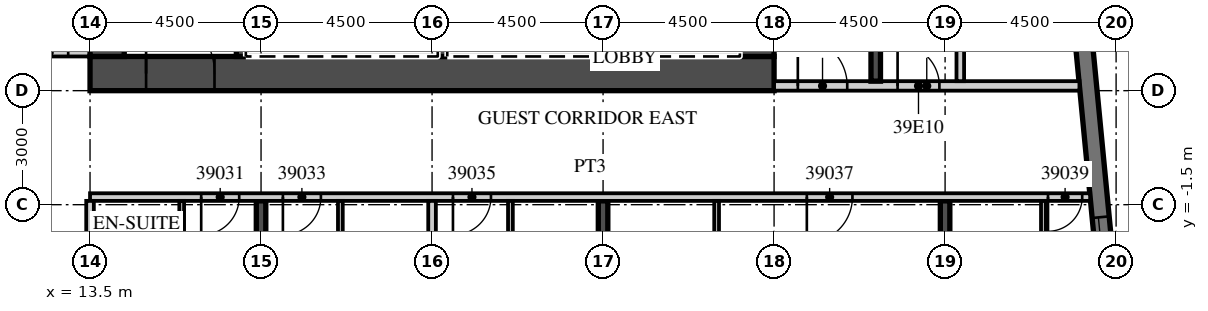
"""IFC4 building model, lengths in metres.
Left out: names, types, materials, properties, quantities, classifications, styles, units other than length and angle.
Written with IfcOpenShell. Run it as: python <this file> out.ifc"""

import sys

from ifc_helpers import new_model, si_unit, direction, frame, frame_2d, origin, place, context, subcontext, project, spatial, rectangle, extrude, element, fill, save


model = new_model("IFC4")
c1 = context("Model", 3, precision=1e-05, world=origin(), true_north=direction((0.0, 1.0)))
c2 = subcontext(c1, "Body", "Model", "MODEL_VIEW")
j1 = project(units=[si_unit("LENGTHUNIT", "METRE"), si_unit("PLANEANGLEUNIT", "RADIAN")], contexts=[c1])
p1 = place(None, origin())
s1 = spatial("IfcSite", under=j1, at=p1, CompositionType="ELEMENT")
p2 = place(p1, origin())
s2 = spatial("IfcBuilding", under=s1, at=p2, CompositionType="ELEMENT")
p3 = place(p2, frame((0.0, 0.0, 170.2)))
s3 = spatial("IfcBuildingStorey", under=s2, at=p3, CompositionType="ELEMENT", Elevation=170.2)
p4 = place(p3, frame((18.0, -19.245, 0.0), z_axis=(0.0, 0.0, 1.0), x_axis=(0.0, 1.0, 0.0)))
e1 = element("IfcWall", 1, at=p4, inside=s3, PredefinedType="SHEAR", context=c2, shape_type="SweptSolid", body=[
    extrude(rectangle(XDim=17.845, YDim=0.25, at=frame_2d((8.923, 0.0))), origin(), (0.0, 0.0, 1.0), 3.3),
])
p5 = place(p3, frame((27.0, -18.379, 0.0), z_axis=(0.0, 0.0, 1.0), x_axis=(0.0, 1.0, 0.0)))
e2 = element("IfcWall", 2, at=p5, inside=s3, PredefinedType="SHEAR", context=c2, shape_type="SweptSolid", body=[
    extrude(rectangle(XDim=16.979, YDim=0.25, at=frame_2d((8.489, 0.0))), origin(), (0.0, 0.0, 1.0), 3.3),
])
p6 = place(p3, frame((36.0, -17.512, 0.0), z_axis=(0.0, 0.0, 1.0), x_axis=(0.0, 1.0, 0.0)))
e3 = element("IfcWall", 3, at=p6, inside=s3, PredefinedType="SHEAR", context=c2, shape_type="SweptSolid", body=[
    extrude(rectangle(XDim=16.112, YDim=0.25, at=frame_2d((8.056, 0.0))), origin(), (0.0, 0.0, 1.0), 3.3),
])
p7 = place(p3, frame((41.214, -13.466, 0.0), z_axis=(0.0, 0.0, 1.0), x_axis=(-0.095847314626, 0.995396047952, 0.0)))
e4 = element("IfcWall", 4, at=p7, inside=s3, PredefinedType="SOLIDWALL", context=c2, shape_type="SweptSolid", body=[
    extrude(rectangle(XDim=34.0, YDim=0.45, at=frame_2d((17.0, 0.0))), origin(), (0.0, 0.0, 1.0), 3.02),
])
p8 = place(p7, frame((3.869, 0.0, 0.45)))
e5 = element("IfcOpeningElement", 5, at=p8, cuts=e4, PredefinedType="OPENING", context=c2, shape_type="SweptSolid", body=[
    extrude(rectangle(XDim=3.3, YDim=2.25, at=frame_2d((1.65, 1.125))), frame((0.0, 0.235, 0.0), z_axis=(0.0, -1.0, 0.0), x_axis=(1.0, 0.0, 0.0)), (0.0, 0.0, 1.0), 0.47),
])
p9 = place(p7, frame((8.39, 0.0, 0.45)))
e6 = element("IfcOpeningElement", 6, at=p9, cuts=e4, PredefinedType="OPENING", context=c2, shape_type="SweptSolid", body=[
    extrude(rectangle(XDim=3.3, YDim=2.25, at=frame_2d((1.65, 1.125))), frame((0.0, 0.235, 0.0), z_axis=(0.0, -1.0, 0.0), x_axis=(1.0, 0.0, 0.0)), (0.0, 0.0, 1.0), 0.47),
])
p10 = place(p3, frame((-13.5, 2.5, 0.0), z_axis=(0.0, 0.0, 1.0), x_axis=(1.0, 0.0, 0.0)))
e7 = element("IfcWall", 7, at=p10, inside=s3, PredefinedType="PARTITIONING", context=c2, shape_type="SweptSolid", body=[
    extrude(rectangle(XDim=27.0, YDim=0.2, at=frame_2d((13.5, 0.0))), origin(), (0.0, 0.0, 1.0), 3.02),
])
p11 = place(p10, frame((0.575, 0.0, 0.0)))
e8 = element("IfcOpeningElement", 8, at=p11, cuts=e7, PredefinedType="OPENING", context=c2, shape_type="SweptSolid", body=[
    extrude(rectangle(XDim=1.0, YDim=2.1, at=frame_2d((0.5, 1.05))), frame((0.0, 0.11, 0.0), z_axis=(0.0, -1.0, 0.0), x_axis=(1.0, 0.0, 0.0)), (0.0, 0.0, 1.0), 0.22),
])
p12 = place(p10, frame((7.45, 0.0, 0.0)))
e9 = element("IfcOpeningElement", 9, at=p12, cuts=e7, PredefinedType="OPENING", context=c2, shape_type="SweptSolid", body=[
    extrude(rectangle(XDim=1.0, YDim=2.1, at=frame_2d((0.5, 1.05))), frame((0.0, 0.11, 0.0), z_axis=(0.0, -1.0, 0.0), x_axis=(1.0, 0.0, 0.0)), (0.0, 0.0, 1.0), 0.22),
])
p13 = place(p10, frame((11.925, 0.0, 0.0)))
e10 = element("IfcOpeningElement", 10, at=p13, cuts=e7, PredefinedType="OPENING", context=c2, shape_type="SweptSolid", body=[
    extrude(rectangle(XDim=1.0, YDim=2.1, at=frame_2d((0.5, 1.05))), frame((0.0, 0.11, 0.0), z_axis=(0.0, -1.0, 0.0), x_axis=(1.0, 0.0, 0.0)), (0.0, 0.0, 1.0), 0.22),
])
p14 = place(p10, frame((15.938, 0.0, 0.0)))
e11 = element("IfcOpeningElement", 11, at=p14, cuts=e7, PredefinedType="OPENING", context=c2, shape_type="SweptSolid", body=[
    extrude(rectangle(XDim=1.2, YDim=2.1, at=frame_2d((0.6, 1.05))), frame((0.0, 0.11, 0.0), z_axis=(0.0, -1.0, 0.0), x_axis=(1.0, 0.0, 0.0)), (0.0, 0.0, 1.0), 0.22),
])
p15 = place(p10, frame((25.425, 0.0, 0.0)))
e12 = element("IfcOpeningElement", 12, at=p15, cuts=e7, PredefinedType="OPENING", context=c2, shape_type="SweptSolid", body=[
    extrude(rectangle(XDim=1.0, YDim=2.1, at=frame_2d((0.5, 1.05))), frame((0.0, 0.11, 0.0), z_axis=(0.0, -1.0, 0.0), x_axis=(1.0, 0.0, 0.0)), (0.0, 0.0, 1.0), 0.22),
])
p16 = place(p3, frame((13.5, -1.3, 0.0), z_axis=(0.0, 0.0, 1.0), x_axis=(1.0, 0.0, 0.0)))
e13 = element("IfcWall", 13, at=p16, inside=s3, PredefinedType="PARTITIONING", context=c2, shape_type="SweptSolid", body=[
    extrude(rectangle(XDim=26.317, YDim=0.2, at=frame_2d((13.158, 0.0))), origin(), (0.0, 0.0, 1.0), 3.02),
])
p17 = place(p16, frame((2.925, 0.0, 0.0)))
e14 = element("IfcOpeningElement", 14, at=p17, cuts=e13, PredefinedType="OPENING", context=c2, shape_type="SweptSolid", body=[
    extrude(rectangle(XDim=1.0, YDim=2.1, at=frame_2d((0.5, 1.05))), frame((0.0, 0.11, 0.0), z_axis=(0.0, -1.0, 0.0), x_axis=(1.0, 0.0, 0.0)), (0.0, 0.0, 1.0), 0.22),
])
p18 = place(p16, frame((5.075, 0.0, 0.0)))
e15 = element("IfcOpeningElement", 15, at=p18, cuts=e13, PredefinedType="OPENING", context=c2, shape_type="SweptSolid", body=[
    extrude(rectangle(XDim=1.0, YDim=2.1, at=frame_2d((0.5, 1.05))), frame((0.0, 0.11, 0.0), z_axis=(0.0, -1.0, 0.0), x_axis=(1.0, 0.0, 0.0)), (0.0, 0.0, 1.0), 0.22),
])
p19 = place(p16, frame((9.55, 0.0, 0.0)))
e16 = element("IfcOpeningElement", 16, at=p19, cuts=e13, PredefinedType="OPENING", context=c2, shape_type="SweptSolid", body=[
    extrude(rectangle(XDim=1.0, YDim=2.1, at=frame_2d((0.5, 1.05))), frame((0.0, 0.11, 0.0), z_axis=(0.0, -1.0, 0.0), x_axis=(1.0, 0.0, 0.0)), (0.0, 0.0, 1.0), 0.22),
])
p20 = place(p16, frame((18.862, 0.0, 0.0)))
e17 = element("IfcOpeningElement", 17, at=p20, cuts=e13, PredefinedType="OPENING", context=c2, shape_type="SweptSolid", body=[
    extrude(rectangle(XDim=1.2, YDim=2.1, at=frame_2d((0.6, 1.05))), frame((0.0, 0.11, 0.0), z_axis=(0.0, -1.0, 0.0), x_axis=(1.0, 0.0, 0.0)), (0.0, 0.0, 1.0), 0.22),
])
p21 = place(p16, frame((25.208, 0.0, 0.0)))
e18 = element("IfcOpeningElement", 18, at=p21, cuts=e13, PredefinedType="OPENING", context=c2, shape_type="SweptSolid", body=[
    extrude(rectangle(XDim=0.9, YDim=2.1, at=frame_2d((0.45, 1.05))), frame((0.0, 0.11, 0.0), z_axis=(0.0, -1.0, 0.0), x_axis=(1.0, 0.0, 0.0)), (0.0, 0.0, 1.0), 0.22),
])
p22 = place(p3, frame((13.5, -19.701, 0.0), z_axis=(0.0, 0.0, 1.0), x_axis=(0.0, 1.0, 0.0)))
e19 = element("IfcWall", 19, at=p22, inside=s3, PredefinedType="PARTITIONING", context=c2, shape_type="SweptSolid", body=[
    extrude(rectangle(XDim=18.301, YDim=0.2, at=frame_2d((9.15, 0.0))), origin(), (0.0, 0.0, 1.0), 3.02),
])
p23 = place(p3, frame((15.912, -7.125, 0.0), z_axis=(0.0, 0.0, 1.0), x_axis=(0.0, 1.0, 0.0)))
e20 = element("IfcWall", 20, at=p23, inside=s3, PredefinedType="PARTITIONING", context=c2, shape_type="SweptSolid", body=[
    extrude(rectangle(XDim=5.725, YDim=0.125, at=frame_2d((2.863, 0.0))), origin(), (0.0, 0.0, 1.0), 3.02),
])
p24 = place(p23, frame((2.375, 0.0, 0.0)))
e21 = element("IfcOpeningElement", 21, at=p24, cuts=e20, PredefinedType="OPENING", context=c2, shape_type="SweptSolid", body=[
    extrude(rectangle(XDim=0.9, YDim=2.1, at=frame_2d((0.45, 1.05))), frame((0.0, 0.073, 0.0), z_axis=(0.0, -1.0, 0.0), x_axis=(1.0, 0.0, 0.0)), (0.0, 0.0, 1.0), 0.145),
])
p25 = place(p3, frame((22.5, -18.834, 0.0), z_axis=(0.0, 0.0, 1.0), x_axis=(0.0, 1.0, 0.0)))
e22 = element("IfcWall", 22, at=p25, inside=s3, PredefinedType="PARTITIONING", context=c2, shape_type="SweptSolid", body=[
    extrude(rectangle(XDim=17.434, YDim=0.2, at=frame_2d((8.717, 0.0))), origin(), (0.0, 0.0, 1.0), 3.02),
])
p26 = place(p3, frame((20.087, -7.125, 0.0), z_axis=(0.0, 0.0, 1.0), x_axis=(0.0, 1.0, 0.0)))
e23 = element("IfcWall", 23, at=p26, inside=s3, PredefinedType="PARTITIONING", context=c2, shape_type="SweptSolid", body=[
    extrude(rectangle(XDim=5.725, YDim=0.125, at=frame_2d((2.863, 0.0))), origin(), (0.0, 0.0, 1.0), 3.02),
])
p27 = place(p26, frame((2.375, 0.0, 0.0)))
e24 = element("IfcOpeningElement", 24, at=p27, cuts=e23, PredefinedType="OPENING", context=c2, shape_type="SweptSolid", body=[
    extrude(rectangle(XDim=0.9, YDim=2.1, at=frame_2d((0.45, 1.05))), frame((0.0, 0.073, 0.0), z_axis=(0.0, -1.0, 0.0), x_axis=(1.0, 0.0, 0.0)), (0.0, 0.0, 1.0), 0.145),
])
p28 = place(p3, frame((24.562, -7.125, 0.0), z_axis=(0.0, 0.0, 1.0), x_axis=(0.0, 1.0, 0.0)))
e25 = element("IfcWall", 25, at=p28, inside=s3, PredefinedType="PARTITIONING", context=c2, shape_type="SweptSolid", body=[
    extrude(rectangle(XDim=5.725, YDim=0.125, at=frame_2d((2.863, 0.0))), origin(), (0.0, 0.0, 1.0), 3.02),
])
p29 = place(p28, frame((2.375, 0.0, 0.0)))
e26 = element("IfcOpeningElement", 26, at=p29, cuts=e25, PredefinedType="OPENING", context=c2, shape_type="SweptSolid", body=[
    extrude(rectangle(XDim=0.9, YDim=2.1, at=frame_2d((0.45, 1.05))), frame((0.0, 0.073, 0.0), z_axis=(0.0, -1.0, 0.0), x_axis=(1.0, 0.0, 0.0)), (0.0, 0.0, 1.0), 0.145),
])
p30 = place(p3, frame((29.988, -7.125, 0.0), z_axis=(0.0, 0.0, 1.0), x_axis=(0.0, 1.0, 0.0)))
e27 = element("IfcWall", 27, at=p30, inside=s3, PredefinedType="PARTITIONING", context=c2, shape_type="SweptSolid", body=[
    extrude(rectangle(XDim=5.725, YDim=0.125, at=frame_2d((2.863, 0.0))), origin(), (0.0, 0.0, 1.0), 3.02),
])
p31 = place(p30, frame((2.375, 0.0, 0.0)))
e28 = element("IfcOpeningElement", 28, at=p31, cuts=e27, PredefinedType="OPENING", context=c2, shape_type="SweptSolid", body=[
    extrude(rectangle(XDim=0.9, YDim=2.1, at=frame_2d((0.45, 1.05))), frame((0.0, 0.073, 0.0), z_axis=(0.0, -1.0, 0.0), x_axis=(1.0, 0.0, 0.0)), (0.0, 0.0, 1.0), 0.145),
])
p32 = place(p3, frame((38.587, -6.445, 0.0), z_axis=(0.0, 0.0, 1.0), x_axis=(0.0, 1.0, 0.0)))
e29 = element("IfcWall", 29, at=p32, inside=s3, PredefinedType="PARTITIONING", context=c2, shape_type="SweptSolid", body=[
    extrude(rectangle(XDim=5.045, YDim=0.125, at=frame_2d((2.522, 0.0))), origin(), (0.0, 0.0, 1.0), 3.02),
])
p33 = place(p32, frame((1.695, 0.0, 0.0)))
e30 = element("IfcOpeningElement", 30, at=p33, cuts=e29, PredefinedType="OPENING", context=c2, shape_type="SweptSolid", body=[
    extrude(rectangle(XDim=0.9, YDim=2.1, at=frame_2d((0.45, 1.05))), frame((0.0, 0.073, 0.0), z_axis=(0.0, -1.0, 0.0), x_axis=(1.0, 0.0, 0.0)), (0.0, 0.0, 1.0), 0.145),
])
p34 = place(p3, frame((13.5, 1.95, 0.0), z_axis=(0.0, 0.0, 1.0), x_axis=(1.0, 0.0, 0.0)))
e31 = element("IfcWall", 31, at=p34, inside=s3, PredefinedType="SHEAR", context=c2, shape_type="SweptSolid", body=[
    extrude(rectangle(XDim=18.0, YDim=0.9, at=frame_2d((9.0, 0.0))), origin(), (0.0, 0.0, 1.0), 3.02),
])
p35 = place(p34, frame((1.475, 0.0, 0.0)))
e32 = element("IfcOpeningElement", 32, at=p35, cuts=e31, PredefinedType="OPENING", context=c2, shape_type="SweptSolid", body=[
    extrude(rectangle(XDim=1.8, YDim=2.1, at=frame_2d((0.9, 1.05))), frame((0.0, 0.46, 0.0), z_axis=(0.0, -1.0, 0.0), x_axis=(1.0, 0.0, 0.0)), (0.0, 0.0, 1.0), 0.92),
])
p36 = place(p3, frame((31.05, 2.4, 0.0), z_axis=(0.0, 0.0, 1.0), x_axis=(0.0, 1.0, 0.0)))
e33 = element("IfcWall", 33, at=p36, inside=s3, PredefinedType="SHEAR", context=c2, shape_type="SweptSolid", body=[
    extrude(rectangle(XDim=12.8, YDim=0.9, at=frame_2d((6.4, 0.0))), origin(), (0.0, 0.0, 1.0), 3.02),
])
p37 = place(p36, frame((0.2, 0.0, 0.0)))
e34 = element("IfcOpeningElement", 34, at=p37, cuts=e33, PredefinedType="OPENING", context=c2, shape_type="SweptSolid", body=[
    extrude(rectangle(XDim=1.1, YDim=2.1, at=frame_2d((0.55, 1.05))), frame((0.0, 0.46, 0.0), z_axis=(0.0, -1.0, 0.0), x_axis=(1.0, 0.0, 0.0)), (0.0, 0.0, 1.0), 0.92),
])
p38 = place(p3, frame((13.95, 2.4, 0.0), z_axis=(0.0, 0.0, 1.0), x_axis=(0.0, 1.0, 0.0)))
e35 = element("IfcWall", 35, at=p38, inside=s3, PredefinedType="SHEAR", context=c2, shape_type="SweptSolid", body=[
    extrude(rectangle(XDim=12.2, YDim=0.9, at=frame_2d((6.1, 0.0))), origin(), (0.0, 0.0, 1.0), 3.02),
])
p39 = place(p3, frame((17.475, 2.4, 0.0), z_axis=(0.0, 0.0, 1.0), x_axis=(0.0, 1.0, 0.0)))
e36 = element("IfcWall", 36, at=p39, inside=s3, PredefinedType="SHEAR", context=c2, shape_type="SweptSolid", body=[
    extrude(rectangle(XDim=3.15, YDim=0.25, at=frame_2d((1.575, 0.0))), origin(), (0.0, 0.0, 1.0), 3.02),
])
for number, where, z_axis, x_axis in (
    (37, (27.975, 2.4, 0.0), (0.0, 0.0, 1.0), (0.0, 1.0, 0.0)),
    (38, (22.775, 2.4, 0.0), (0.0, 0.0, 1.0), (0.0, 1.0, 0.0)),
):
    element("IfcWall", number, at=place(p3, frame(where, z_axis=z_axis, x_axis=x_axis)), inside=s3, PredefinedType="SHEAR", context=c2, shape_type="SweptSolid", body=[
        extrude(rectangle(XDim=2.9, YDim=0.25, at=frame_2d((1.45, 0.0))), origin(), (0.0, 0.0, 1.0), 3.02),
    ])
p40 = place(p3, frame((31.5, 1.625, 0.0), z_axis=(0.0, 0.0, 1.0), x_axis=(1.0, 0.0, 0.0)))
e39 = element("IfcWall", 39, at=p40, inside=s3, PredefinedType="PARTITIONING", context=c2, shape_type="SweptSolid", body=[
    extrude(rectangle(XDim=8.035, YDim=0.25, at=frame_2d((4.018, 0.0))), origin(), (0.0, 0.0, 1.0), 3.02),
])
p41 = place(p40, frame((0.625, 0.0, 0.0)))
e40 = element("IfcOpeningElement", 40, at=p41, cuts=e39, PredefinedType="OPENING", context=c2, shape_type="SweptSolid", body=[
    extrude(rectangle(XDim=1.3, YDim=2.1, at=frame_2d((0.65, 1.05))), frame((0.0, 0.135, 0.0), z_axis=(0.0, -1.0, 0.0), x_axis=(1.0, 0.0, 0.0)), (0.0, 0.0, 1.0), 0.27),
])
p42 = place(p40, frame((3.25, 0.0, 0.0)))
e41 = element("IfcOpeningElement", 41, at=p42, cuts=e39, PredefinedType="OPENING", context=c2, shape_type="SweptSolid", body=[
    extrude(rectangle(XDim=1.1, YDim=2.1, at=frame_2d((0.55, 1.05))), frame((0.0, 0.135, 0.0), z_axis=(0.0, -1.0, 0.0), x_axis=(1.0, 0.0, 0.0)), (0.0, 0.0, 1.0), 0.27),
])
p43 = place(p3, frame((34.175, 1.75, 0.0), z_axis=(0.0, 0.0, 1.0), x_axis=(0.0, 1.0, 0.0)))
e42 = element("IfcWall", 42, at=p43, inside=s3, PredefinedType="SHEAR", context=c2, shape_type="SweptSolid", body=[
    extrude(rectangle(XDim=8.35, YDim=0.25, at=frame_2d((4.175, 0.0))), origin(), (0.0, 0.0, 1.0), 3.02),
])
p44 = place(p3, frame((36.4, 1.75, 0.0), z_axis=(0.0, 0.0, 1.0), x_axis=(0.0, 1.0, 0.0)))
e43 = element("IfcWall", 43, at=p44, inside=s3, PredefinedType="PARTITIONING", context=c2, shape_type="SweptSolid", body=[
    extrude(rectangle(XDim=15.95, YDim=0.2, at=frame_2d((7.975, 0.0))), origin(), (0.0, 0.0, 1.0), 3.02),
])
p45 = place(p44, frame((14.7, 0.0, 0.0)))
e44 = element("IfcOpeningElement", 44, at=p45, cuts=e43, PredefinedType="OPENING", context=c2, shape_type="SweptSolid", body=[
    extrude(rectangle(XDim=0.9, YDim=2.1, at=frame_2d((0.45, 1.05))), frame((0.0, 0.11, 0.0), z_axis=(0.0, -1.0, 0.0), x_axis=(1.0, 0.0, 0.0)), (0.0, 0.0, 1.0), 0.22),
])
p46 = place(p9, origin())
e45 = element("IfcWindow", 45, at=p46, inside=s3, PartitioningType="SINGLE_PANEL", PredefinedType="WINDOW", context=c2, shape_type="SweptSolid", body=[
    extrude(rectangle(XDim=3.3, YDim=2.25, at=frame_2d((1.65, 1.125))), frame((0.0, 0.09, 0.0), z_axis=(0.0, -1.0, 0.0), x_axis=(1.0, 0.0, 0.0)), (0.0, 0.0, 1.0), 0.06),
])
fill(e6, e45)
p47 = place(p15, origin())
e46 = element("IfcDoor", 46, at=p47, inside=s3, OperationType="SINGLE_SWING_LEFT", PredefinedType="DOOR", context=c2, shape_type="SweptSolid", body=[
    extrude(rectangle(XDim=1.0, YDim=2.1, at=frame_2d((0.5, 1.05))), frame((0.0, 0.025, 0.0), z_axis=(0.0, -1.0, 0.0), x_axis=(1.0, 0.0, 0.0)), (0.0, 0.0, 1.0), 0.05),
])
fill(e12, e46)
p48 = place(p17, origin())
e47 = element("IfcDoor", 47, at=p48, inside=s3, OperationType="SINGLE_SWING_LEFT", PredefinedType="DOOR", context=c2, shape_type="SweptSolid", body=[
    extrude(rectangle(XDim=1.0, YDim=2.1, at=frame_2d((0.5, 1.05))), frame((0.0, 0.025, 0.0), z_axis=(0.0, -1.0, 0.0), x_axis=(1.0, 0.0, 0.0)), (0.0, 0.0, 1.0), 0.05),
])
fill(e14, e47)
p49 = place(p18, origin())
e48 = element("IfcDoor", 48, at=p49, inside=s3, OperationType="SINGLE_SWING_LEFT", PredefinedType="DOOR", context=c2, shape_type="SweptSolid", body=[
    extrude(rectangle(XDim=1.0, YDim=2.1, at=frame_2d((0.5, 1.05))), frame((0.0, 0.025, 0.0), z_axis=(0.0, -1.0, 0.0), x_axis=(1.0, 0.0, 0.0)), (0.0, 0.0, 1.0), 0.05),
])
fill(e15, e48)
p50 = place(p19, origin())
e49 = element("IfcDoor", 49, at=p50, inside=s3, OperationType="SINGLE_SWING_LEFT", PredefinedType="DOOR", context=c2, shape_type="SweptSolid", body=[
    extrude(rectangle(XDim=1.0, YDim=2.1, at=frame_2d((0.5, 1.05))), frame((0.0, 0.025, 0.0), z_axis=(0.0, -1.0, 0.0), x_axis=(1.0, 0.0, 0.0)), (0.0, 0.0, 1.0), 0.05),
])
fill(e16, e49)
p51 = place(p20, origin())
e50 = element("IfcDoor", 50, at=p51, inside=s3, OperationType="SINGLE_SWING_LEFT", PredefinedType="DOOR", context=c2, shape_type="SweptSolid", body=[
    extrude(rectangle(XDim=1.2, YDim=2.1, at=frame_2d((0.6, 1.05))), frame((0.0, 0.025, 0.0), z_axis=(0.0, -1.0, 0.0), x_axis=(1.0, 0.0, 0.0)), (0.0, 0.0, 1.0), 0.05),
])
fill(e17, e50)
p52 = place(p21, origin())
e51 = element("IfcDoor", 51, at=p52, inside=s3, OperationType="SINGLE_SWING_LEFT", PredefinedType="DOOR", context=c2, shape_type="SweptSolid", body=[
    extrude(rectangle(XDim=0.9, YDim=2.1, at=frame_2d((0.45, 1.05))), frame((0.0, 0.025, 0.0), z_axis=(0.0, -1.0, 0.0), x_axis=(1.0, 0.0, 0.0)), (0.0, 0.0, 1.0), 0.05),
])
fill(e18, e51)
p53 = place(p35, origin())
e52 = element("IfcDoor", 52, at=p53, inside=s3, OperationType="DOUBLE_DOOR_DOUBLE_SWING", PredefinedType="DOOR", context=c2, shape_type="SweptSolid", body=[
    extrude(rectangle(XDim=1.8, YDim=2.1, at=frame_2d((0.9, 1.05))), frame((0.0, 0.025, 0.0), z_axis=(0.0, -1.0, 0.0), x_axis=(1.0, 0.0, 0.0)), (0.0, 0.0, 1.0), 0.05),
])
fill(e32, e52)
p54 = place(p41, origin())
e53 = element("IfcDoor", 53, at=p54, inside=s3, OperationType="SINGLE_SWING_LEFT", PredefinedType="DOOR", context=c2, shape_type="SweptSolid", body=[
    extrude(rectangle(XDim=1.3, YDim=2.1, at=frame_2d((0.65, 1.05))), frame((0.0, 0.025, 0.0), z_axis=(0.0, -1.0, 0.0), x_axis=(1.0, 0.0, 0.0)), (0.0, 0.0, 1.0), 0.05),
])
fill(e40, e53)
p55 = place(p42, origin())
e54 = element("IfcDoor", 54, at=p55, inside=s3, OperationType="SINGLE_SWING_LEFT", PredefinedType="DOOR", context=c2, shape_type="SweptSolid", body=[
    extrude(rectangle(XDim=1.1, YDim=2.1, at=frame_2d((0.55, 1.05))), frame((0.0, 0.025, 0.0), z_axis=(0.0, -1.0, 0.0), x_axis=(1.0, 0.0, 0.0)), (0.0, 0.0, 1.0), 0.05),
])
fill(e41, e54)
save(model, sys.argv[1])
